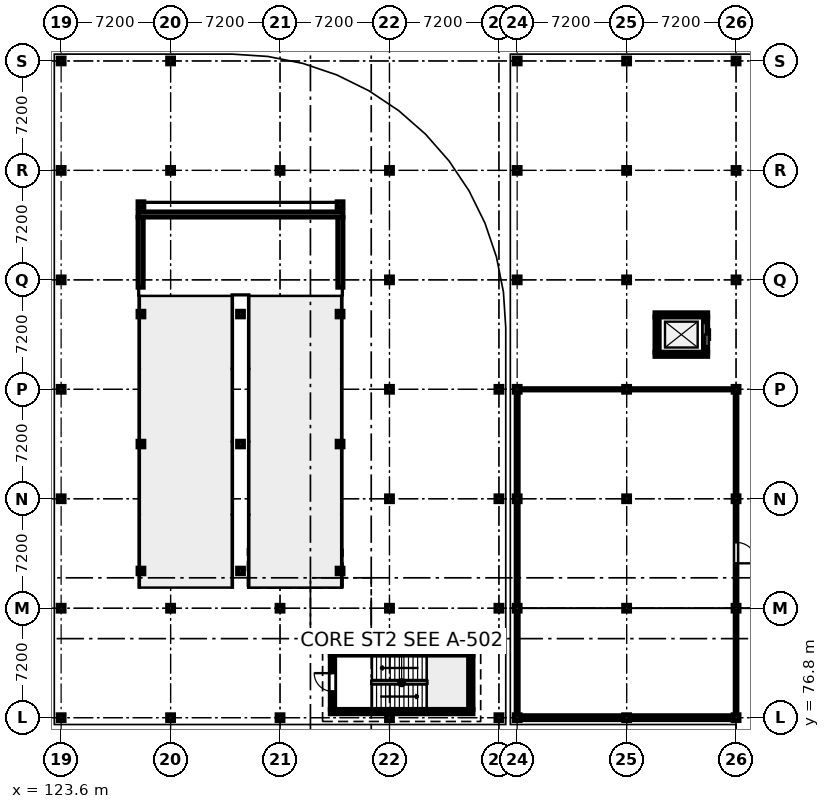
"""IFC4 building model, lengths in metres.
Left out: names, types, materials, properties, quantities, classifications, styles, units other than length and angle.
Written with IfcOpenShell. Run it as: python <this file> out.ifc"""

import sys

from ifc_helpers import new_model, si_unit, direction, frame, frame_2d, origin, origin_2d, place, context, subcontext, project, spatial, rectangle, i_section, extrude, element, fill, save


model = new_model("IFC4")
c1 = context("Model", 3, precision=1e-05, world=origin(), true_north=direction((0.0, 1.0)))
c2 = subcontext(c1, "Body", "Model", "MODEL_VIEW")
j1 = project(units=[si_unit("LENGTHUNIT", "METRE"), si_unit("PLANEANGLEUNIT", "RADIAN")], contexts=[c1])
p1 = place(None, origin())
s1 = spatial("IfcSite", under=j1, at=p1, CompositionType="ELEMENT")
p2 = place(p1, origin())
s2 = spatial("IfcBuilding", under=s1, at=p2, CompositionType="ELEMENT")
p3 = place(p2, frame((0.0, 0.0, -4.5)))
s3 = spatial("IfcBuildingStorey", under=s2, at=p3, CompositionType="ELEMENT", Elevation=-4.5)
for number, where, z_axis, x_axis in (
    (1, (123.6, 76.8, 0.0), (0.0, 0.0, 1.0), (1.0, 0.0, 0.0)),
    (2, (123.6, 84.0, 0.0), (0.0, 0.0, 1.0), (1.0, 0.0, 0.0)),
    (3, (123.6, 91.2, 0.0), (0.0, 0.0, 1.0), (1.0, 0.0, 0.0)),
    (4, (123.6, 98.4, 0.0), (0.0, 0.0, 1.0), (1.0, 0.0, 0.0)),
    (5, (123.6, 105.6, 0.0), (0.0, 0.0, 1.0), (1.0, 0.0, 0.0)),
    (6, (123.6, 112.8, 0.0), (0.0, 0.0, 1.0), (1.0, 0.0, 0.0)),
    (7, (123.6, 120.0, 0.0), (0.0, 0.0, 1.0), (1.0, 0.0, 0.0)),
    (8, (130.8, 76.8, 0.0), (0.0, 0.0, 1.0), (1.0, 0.0, 0.0)),
    (9, (130.8, 84.0, 0.0), (0.0, 0.0, 1.0), (1.0, 0.0, 0.0)),
    (10, (130.8, 112.8, 0.0), (0.0, 0.0, 1.0), (1.0, 0.0, 0.0)),
    (11, (130.8, 120.0, 0.0), (0.0, 0.0, 1.0), (1.0, 0.0, 0.0)),
    (12, (138.0, 76.8, 0.0), (0.0, 0.0, 1.0), (1.0, 0.0, 0.0)),
    (13, (138.0, 84.0, 0.0), (0.0, 0.0, 1.0), (1.0, 0.0, 0.0)),
    (14, (138.0, 112.8, 0.0), (0.0, 0.0, 1.0), (1.0, 0.0, 0.0)),
    (15, (145.2, 76.8, 0.0), (0.0, 0.0, 1.0), (1.0, 0.0, 0.0)),
    (16, (145.2, 84.0, 0.0), (0.0, 0.0, 1.0), (1.0, 0.0, 0.0)),
    (17, (145.2, 91.2, 0.0), (0.0, 0.0, 1.0), (1.0, 0.0, 0.0)),
    (18, (145.2, 98.4, 0.0), (0.0, 0.0, 1.0), (1.0, 0.0, 0.0)),
    (19, (145.2, 105.6, 0.0), (0.0, 0.0, 1.0), (1.0, 0.0, 0.0)),
    (20, (145.2, 112.8, 0.0), (0.0, 0.0, 1.0), (1.0, 0.0, 0.0)),
    (21, (152.4, 76.8, 0.0), (0.0, 0.0, 1.0), (1.0, 0.0, 0.0)),
    (22, (152.4, 84.0, 0.0), (0.0, 0.0, 1.0), (1.0, 0.0, 0.0)),
    (23, (152.4, 91.2, 0.0), (0.0, 0.0, 1.0), (1.0, 0.0, 0.0)),
    (24, (152.4, 98.4, 0.0), (0.0, 0.0, 1.0), (1.0, 0.0, 0.0)),
):
    element("IfcColumn", number, at=place(p3, frame(where, z_axis=z_axis, x_axis=x_axis)), inside=s3, PredefinedType="COLUMN", context=c2, shape_type="SweptSolid", body=[
        extrude(i_section(OverallWidth=0.399, OverallDepth=0.394, WebThickness=0.023, FlangeThickness=0.037, FilletRadius=0.015, at=origin_2d()), origin(), (0.0, 0.0, 1.0), 4.5),
    ])
for number, where, z_axis, x_axis in (
    (25, (128.85, 86.45, 0.0), (0.0, 0.0, 1.0), (1.0, 0.0, 0.0)),
    (26, (135.4, 86.45, 0.0), (0.0, 0.0, 1.0), (1.0, 0.0, 0.0)),
    (27, (141.95, 86.45, 0.0), (0.0, 0.0, 1.0), (1.0, 0.0, 0.0)),
    (28, (128.85, 94.8, 0.0), (0.0, 0.0, 1.0), (1.0, 0.0, 0.0)),
    (29, (135.4, 94.8, 0.0), (0.0, 0.0, 1.0), (1.0, 0.0, 0.0)),
    (30, (141.95, 94.8, 0.0), (0.0, 0.0, 1.0), (1.0, 0.0, 0.0)),
    (31, (128.85, 103.35, 0.0), (0.0, 0.0, 1.0), (1.0, 0.0, 0.0)),
    (32, (135.4, 103.35, 0.0), (0.0, 0.0, 1.0), (1.0, 0.0, 0.0)),
    (33, (141.95, 103.35, 0.0), (0.0, 0.0, 1.0), (1.0, 0.0, 0.0)),
    (34, (128.85, 110.55, 0.0), (0.0, 0.0, 1.0), (1.0, 0.0, 0.0)),
    (35, (141.95, 110.55, 0.0), (0.0, 0.0, 1.0), (1.0, 0.0, 0.0)),
):
    element("IfcColumn", number, at=place(p3, frame(where, z_axis=z_axis, x_axis=x_axis)), inside=s3, PredefinedType="COLUMN", context=c2, shape_type="SweptSolid", body=[
        extrude(i_section(OverallWidth=0.396, OverallDepth=0.381, WebThickness=0.019, FlangeThickness=0.03, FilletRadius=0.015, at=origin_2d()), origin(), (0.0, 0.0, 1.0), 4.5),
    ])
for number, where, z_axis, x_axis in (
    (36, (153.6, 76.8, 0.0), (0.0, 0.0, 1.0), (1.0, 0.0, 0.0)),
    (37, (153.6, 84.0, 0.0), (0.0, 0.0, 1.0), (1.0, 0.0, 0.0)),
    (38, (153.6, 91.2, 0.0), (0.0, 0.0, 1.0), (1.0, 0.0, 0.0)),
    (39, (153.6, 98.4, 0.0), (0.0, 0.0, 1.0), (1.0, 0.0, 0.0)),
    (40, (153.6, 105.6, 0.0), (0.0, 0.0, 1.0), (1.0, 0.0, 0.0)),
    (41, (153.6, 112.8, 0.0), (0.0, 0.0, 1.0), (1.0, 0.0, 0.0)),
    (42, (153.6, 120.0, 0.0), (0.0, 0.0, 1.0), (1.0, 0.0, 0.0)),
    (43, (160.8, 76.8, 0.0), (0.0, 0.0, 1.0), (1.0, 0.0, 0.0)),
    (44, (160.8, 84.0, 0.0), (0.0, 0.0, 1.0), (1.0, 0.0, 0.0)),
    (45, (160.8, 91.2, 0.0), (0.0, 0.0, 1.0), (1.0, 0.0, 0.0)),
    (46, (160.8, 98.4, 0.0), (0.0, 0.0, 1.0), (1.0, 0.0, 0.0)),
    (47, (160.8, 105.6, 0.0), (0.0, 0.0, 1.0), (1.0, 0.0, 0.0)),
    (48, (160.8, 112.8, 0.0), (0.0, 0.0, 1.0), (1.0, 0.0, 0.0)),
    (49, (160.8, 120.0, 0.0), (0.0, 0.0, 1.0), (1.0, 0.0, 0.0)),
    (50, (168.0, 76.8, 0.0), (0.0, 0.0, 1.0), (1.0, 0.0, 0.0)),
    (51, (168.0, 84.0, 0.0), (0.0, 0.0, 1.0), (1.0, 0.0, 0.0)),
    (52, (168.0, 91.2, 0.0), (0.0, 0.0, 1.0), (1.0, 0.0, 0.0)),
    (53, (168.0, 98.4, 0.0), (0.0, 0.0, 1.0), (1.0, 0.0, 0.0)),
    (54, (168.0, 105.6, 0.0), (0.0, 0.0, 1.0), (1.0, 0.0, 0.0)),
    (55, (168.0, 112.8, 0.0), (0.0, 0.0, 1.0), (1.0, 0.0, 0.0)),
    (56, (168.0, 120.0, 0.0), (0.0, 0.0, 1.0), (1.0, 0.0, 0.0)),
):
    element("IfcColumn", number, at=place(p3, frame(where, z_axis=z_axis, x_axis=x_axis)), inside=s3, PredefinedType="COLUMN", context=c2, shape_type="SweptSolid", body=[
        extrude(i_section(OverallWidth=0.399, OverallDepth=0.394, WebThickness=0.023, FlangeThickness=0.037, FilletRadius=0.015, at=origin_2d()), origin(), (0.0, 0.0, 1.0), 4.5),
    ])
for number, where, z_axis, x_axis in (
    (57, (128.83, 105.11, 0.0), (0.0, 0.0, 1.0), (0.0, 1.0, 0.0)),
    (58, (141.97, 105.11, 0.0), (0.0, 0.0, 1.0), (0.0, 1.0, 0.0)),
):
    element("IfcWall", number, at=place(p3, frame(where, z_axis=z_axis, x_axis=x_axis)), inside=s3, PredefinedType="SHEAR", context=c2, shape_type="SweptSolid", body=[
        extrude(rectangle(XDim=4.615, YDim=0.35, at=frame_2d((2.308, 0.0))), origin(), (0.0, 0.0, 1.0), 1.97),
    ])
p4 = place(p3, frame((128.655, 109.9, 0.0), z_axis=(0.0, 0.0, 1.0), x_axis=(1.0, 0.0, 0.0)))
e59 = element("IfcWall", 59, at=p4, inside=s3, PredefinedType="SHEAR", context=c2, shape_type="SweptSolid", body=[
    extrude(rectangle(XDim=13.49, YDim=0.35, at=frame_2d((6.745, 0.0))), origin(), (0.0, 0.0, 1.0), 1.97),
])
for number, where, z_axis, x_axis in (
    (60, (150.7, 77.2, 0.0), (0.0, 0.0, 1.0), (-1.0, 0.0, 0.0)),
    (61, (141.3, 81.06, 0.0), (0.0, 0.0, 1.0), (1.0, 0.0, 0.0)),
):
    element("IfcWall", number, at=place(p3, frame(where, z_axis=z_axis, x_axis=x_axis)), inside=s3, PredefinedType="SOLIDWALL", context=c2, shape_type="SweptSolid", body=[
        extrude(rectangle(XDim=9.4, YDim=0.3, at=frame_2d((4.7, 0.0))), origin(), (0.0, 0.0, 1.0), 4.25),
    ])
p5 = place(p3, frame((141.45, 77.35, 0.0), z_axis=(0.0, 0.0, 1.0), x_axis=(0.0, 1.0, 0.0)))
e62 = element("IfcWall", 62, at=p5, inside=s3, PredefinedType="SOLIDWALL", context=c2, shape_type="SweptSolid", body=[
    extrude(rectangle(XDim=3.56, YDim=0.3, at=frame_2d((1.78, 0.0))), origin(), (0.0, 0.0, 1.0), 4.25),
])
p6 = place(p5, frame((1.18, 0.0, 0.0)))
e63 = element("IfcOpeningElement", 63, at=p6, cuts=e62, PredefinedType="OPENING", context=c2, shape_type="SweptSolid", body=[
    extrude(rectangle(XDim=1.2, YDim=2.2, at=frame_2d((0.6, 1.1))), frame((0.0, 0.16, 0.0), z_axis=(0.0, -1.0, 0.0), x_axis=(1.0, 0.0, 0.0)), (0.0, 0.0, 1.0), 0.32),
])
p7 = place(p3, frame((150.55, 80.91, 0.0), z_axis=(0.0, 0.0, 1.0), x_axis=(0.0, -1.0, 0.0)))
e64 = element("IfcWall", 64, at=p7, inside=s3, PredefinedType="SOLIDWALL", context=c2, shape_type="SweptSolid", body=[
    extrude(rectangle(XDim=3.56, YDim=0.3, at=frame_2d((1.78, 0.0))), origin(), (0.0, 0.0, 1.0), 4.25),
])
for number, where, z_axis, x_axis in (
    (65, (166.14, 100.705, 0.0), (0.0, 0.0, 1.0), (-1.0, 0.0, 0.0)),
    (66, (162.66, 103.295, 0.0), (0.0, 0.0, 1.0), (1.0, 0.0, 0.0)),
):
    element("IfcWall", number, at=place(p3, frame(where, z_axis=z_axis, x_axis=x_axis)), inside=s3, PredefinedType="SHEAR", context=c2, shape_type="SweptSolid", body=[
        extrude(rectangle(XDim=3.48, YDim=0.29, at=frame_2d((1.74, 0.0))), origin(), (0.0, 0.0, 1.0), 4.18),
    ])
p8 = place(p3, frame((162.805, 100.85, 0.0), z_axis=(0.0, 0.0, 1.0), x_axis=(0.0, 1.0, 0.0)))
e67 = element("IfcWall", 67, at=p8, inside=s3, PredefinedType="SHEAR", context=c2, shape_type="SweptSolid", body=[
    extrude(rectangle(XDim=2.3, YDim=0.29, at=frame_2d((1.15, 0.0))), origin(), (0.0, 0.0, 1.0), 4.18),
])
p9 = place(p3, frame((165.995, 103.15, 0.0), z_axis=(0.0, 0.0, 1.0), x_axis=(0.0, -1.0, 0.0)))
e68 = element("IfcWall", 68, at=p9, inside=s3, PredefinedType="SHEAR", context=c2, shape_type="SweptSolid", body=[
    extrude(rectangle(XDim=2.3, YDim=0.29, at=frame_2d((1.15, 0.0))), origin(), (0.0, 0.0, 1.0), 4.18),
])
p10 = place(p9, frame((0.4, 0.0, 0.0)))
e69 = element("IfcOpeningElement", 69, at=p10, cuts=e68, PredefinedType="OPENING", context=c2, shape_type="SweptSolid", body=[
    extrude(rectangle(XDim=1.5, YDim=2.3, at=frame_2d((0.75, 1.15))), frame((0.0, 0.155, 0.0), z_axis=(0.0, -1.0, 0.0), x_axis=(1.0, 0.0, 0.0)), (0.0, 0.0, 1.0), 0.31),
])
p11 = place(p3, frame((168.08, 76.8, 0.0), z_axis=(0.0, 0.0, 1.0), x_axis=(-1.0, 0.0, 0.0)))
e70 = element("IfcWall", 70, at=p11, inside=s3, PredefinedType="PARTITIONING", context=c2, shape_type="SweptSolid", body=[
    extrude(rectangle(XDim=14.56, YDim=0.27, at=frame_2d((7.28, 0.0))), origin(), (0.0, 0.0, 1.0), 3.403),
])
p12 = place(p3, frame((153.52, 98.4, 0.0), z_axis=(0.0, 0.0, 1.0), x_axis=(1.0, 0.0, 0.0)))
e71 = element("IfcWall", 71, at=p12, inside=s3, PredefinedType="PARTITIONING", context=c2, shape_type="SweptSolid", body=[
    extrude(rectangle(XDim=14.56, YDim=0.095, at=frame_2d((7.28, 0.0))), origin(), (0.0, 0.0, 1.0), 3.403),
])
p13 = place(p3, frame((168.0, 98.351, 0.0), z_axis=(0.0, 0.0, 1.0), x_axis=(0.0, -1.0, 0.0)))
e72 = element("IfcWall", 72, at=p13, inside=s3, PredefinedType="PARTITIONING", context=c2, shape_type="SweptSolid", body=[
    extrude(rectangle(XDim=21.414, YDim=0.125, at=frame_2d((10.707, 0.0))), origin(), (0.0, 0.0, 1.0), 3.403),
])
p14 = place(p13, frame((10.017, 0.0, 0.0)))
e73 = element("IfcOpeningElement", 73, at=p14, cuts=e72, PredefinedType="OPENING", context=c2, shape_type="SweptSolid", body=[
    extrude(rectangle(XDim=1.38, YDim=2.1, at=frame_2d((0.69, 1.05))), frame((0.0, 0.073, 0.0), z_axis=(0.0, -1.0, 0.0), x_axis=(1.0, 0.0, 0.0)), (0.0, 0.0, 1.0), 0.145),
])
p15 = place(p3, frame((153.6, 76.937, 0.0), z_axis=(0.0, 0.0, 1.0), x_axis=(0.0, 1.0, 0.0)))
e74 = element("IfcWall", 74, at=p15, inside=s3, PredefinedType="PARTITIONING", context=c2, shape_type="SweptSolid", body=[
    extrude(rectangle(XDim=21.414, YDim=0.145, at=frame_2d((10.707, 0.0))), origin(), (0.0, 0.0, 1.0), 3.403),
])
p16 = place(p6, origin())
e75 = element("IfcDoor", 75, at=p16, inside=s3, OperationType="SINGLE_SWING_RIGHT", PredefinedType="DOOR", context=c2, shape_type="SweptSolid", body=[
    extrude(rectangle(XDim=1.2, YDim=2.2, at=frame_2d((0.6, 1.1))), frame((0.0, 0.025, 0.0), z_axis=(0.0, -1.0, 0.0), x_axis=(1.0, 0.0, 0.0)), (0.0, 0.0, 1.0), 0.05),
])
fill(e63, e75)
p17 = place(p10, origin())
e76 = element("IfcDoor", 76, at=p17, inside=s3, OperationType="DOUBLE_DOOR_SLIDING", PredefinedType="DOOR", context=c2, shape_type="SweptSolid", body=[
    extrude(rectangle(XDim=1.5, YDim=2.3, at=frame_2d((0.75, 1.15))), frame((0.0, 0.025, 0.0), z_axis=(0.0, -1.0, 0.0), x_axis=(1.0, 0.0, 0.0)), (0.0, 0.0, 1.0), 0.05),
])
fill(e69, e76)
p18 = place(p14, origin())
e77 = element("IfcDoor", 77, at=p18, inside=s3, OperationType="SINGLE_SWING_RIGHT", PredefinedType="DOOR", context=c2, shape_type="SweptSolid", body=[
    extrude(rectangle(XDim=1.38, YDim=2.1, at=frame_2d((0.69, 1.05))), frame((0.0, 0.025, 0.0), z_axis=(0.0, -1.0, 0.0), x_axis=(1.0, 0.0, 0.0)), (0.0, 0.0, 1.0), 0.05),
])
fill(e73, e77)
save(model, sys.argv[1])
